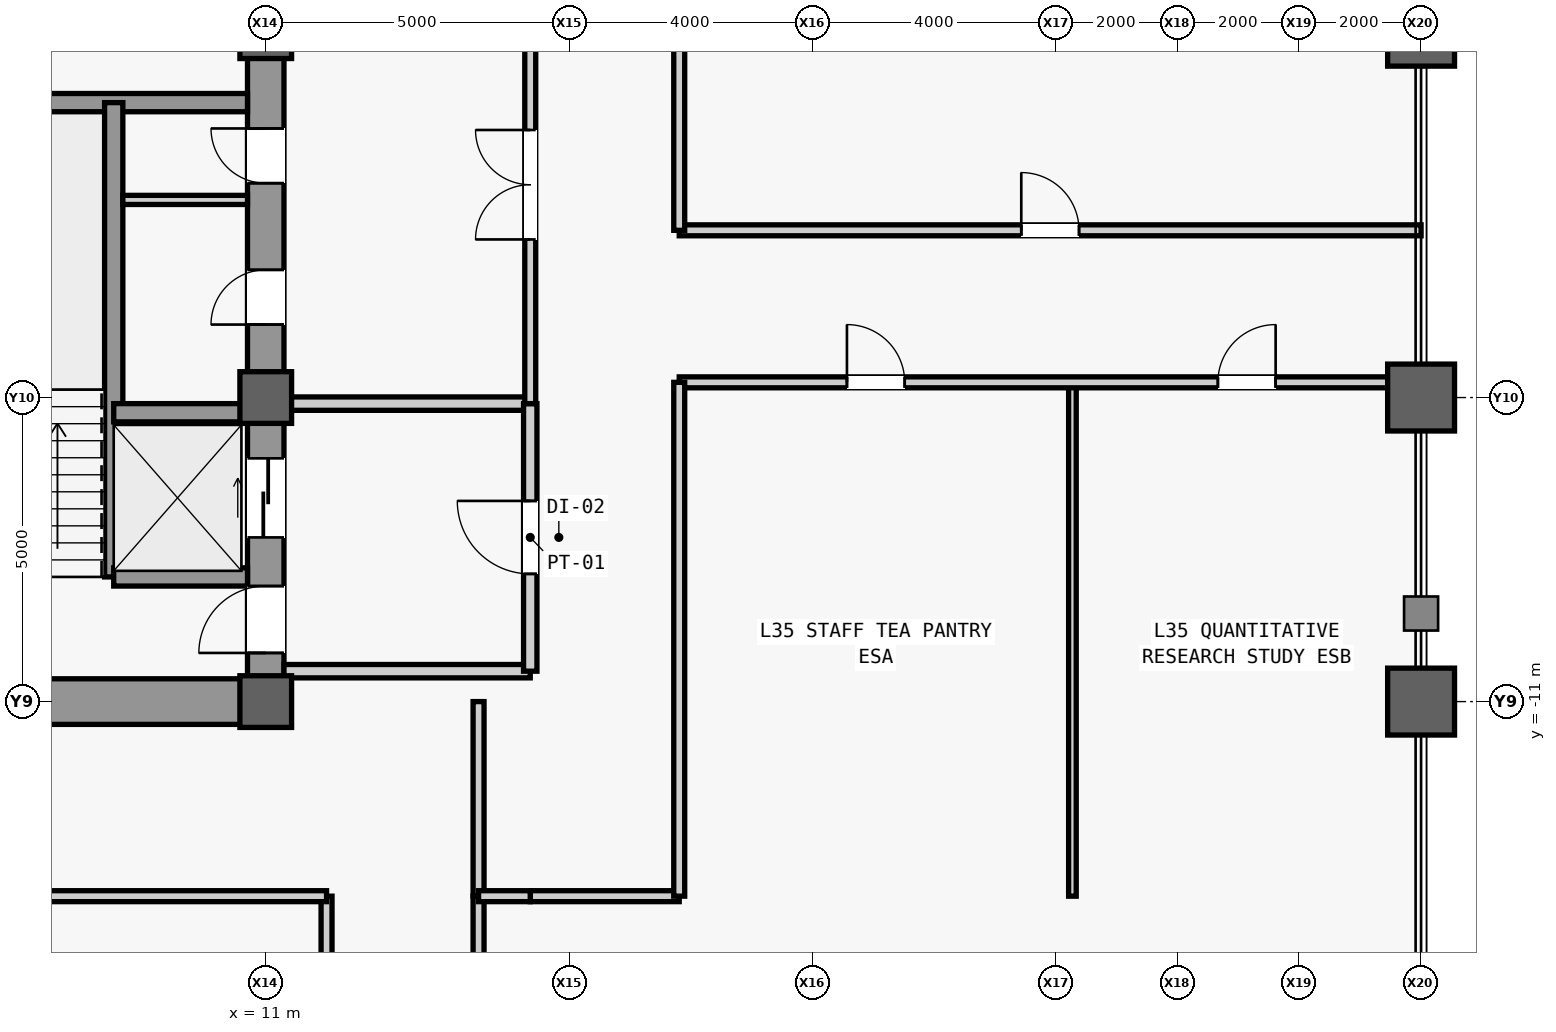
"""IFC4 building model, lengths in metres.
Left out: names, types, materials, properties, quantities, classifications, styles, units other than length and angle.
Written with IfcOpenShell. Run it as: python <this file> out.ifc"""

import sys

from ifc_helpers import new_model, si_unit, direction, frame, frame_2d, origin, origin_2d, place, context, subcontext, project, spatial, rectangle, hollow_rectangle, extrude, source, transform, mapped, element, fill, save


model = new_model("IFC4")
c1 = context("Model", 3, precision=1e-05, world=origin(), true_north=direction((0.0, 1.0)))
c2 = subcontext(c1, "Body", "Model", "MODEL_VIEW")
j1 = project(units=[si_unit("LENGTHUNIT", "METRE"), si_unit("PLANEANGLEUNIT", "RADIAN")], contexts=[c1])
p1 = place(None, origin())
s1 = spatial("IfcSite", under=j1, at=p1, CompositionType="ELEMENT")
p2 = place(p1, origin())
s2 = spatial("IfcBuilding", under=s1, at=p2, CompositionType="ELEMENT")
p3 = place(p2, frame((0.0, 0.0, 155.1)))
s3 = spatial("IfcBuildingStorey", under=s2, at=p3, CompositionType="ELEMENT", Elevation=155.1)
m1 = source(origin(), c2, "Body", "SweptSolid", [
    extrude(rectangle(XDim=22.0, YDim=0.6, at=frame_2d((11.0, 0.0))), origin(), (0.0, 0.0, 1.0), 3.78),
])
p4 = place(p3, frame((11.0, -11.0, 0.0), z_axis=(0.0, 0.0, 1.0), x_axis=(0.0, 1.0, 0.0)))
e1 = element("IfcWall", 1, at=p4, inside=s3, PredefinedType="SHEAR", context=c2, shape_type="MappedRepresentation", body=[
    mapped(m1, transform((0.0, 0.0, 0.0), scale=1.0)),
])
m2 = source(origin(), c2, "Body", "SweptSolid", [
    extrude(rectangle(XDim=1.1, YDim=2.2, at=frame_2d((0.55, 1.1))), frame((0.0, 0.31, 0.0), z_axis=(0.0, -1.0, 0.0), x_axis=(1.0, 0.0, 0.0)), (0.0, 0.0, 1.0), 0.62),
])
p5 = place(p4, frame((0.8, 0.0, 0.0)))
e2 = element("IfcOpeningElement", 2, at=p5, cuts=e1, PredefinedType="OPENING", context=c2, shape_type="MappedRepresentation", body=[
    mapped(m2, transform((0.0, 0.0, 0.0), scale=1.0)),
])
m3 = source(origin(), c2, "Body", "SweptSolid", [
    extrude(rectangle(XDim=0.9, YDim=2.15, at=frame_2d((0.45, 1.075))), frame((0.0, 0.31, 0.0), z_axis=(0.0, -1.0, 0.0), x_axis=(1.0, 0.0, 0.0)), (0.0, 0.0, 1.0), 0.62),
])
p6 = place(p4, frame((6.2, 0.0, 0.0)))
e3 = element("IfcOpeningElement", 3, at=p6, cuts=e1, PredefinedType="OPENING", context=c2, shape_type="MappedRepresentation", body=[
    mapped(m3, transform((0.0, 0.0, 0.0), scale=1.0)),
])
p7 = place(p4, frame((8.525, 0.0, 0.0)))
e4 = element("IfcOpeningElement", 4, at=p7, cuts=e1, PredefinedType="OPENING", context=c2, shape_type="MappedRepresentation", body=[
    mapped(m3, transform((0.0, 0.0, 0.0), scale=1.0)),
])
m4 = source(origin(), c2, "Body", "SweptSolid", [
    extrude(rectangle(XDim=1.3, YDim=2.3, at=frame_2d((0.65, 1.15))), frame((0.0, 0.31, 0.0), z_axis=(0.0, -1.0, 0.0), x_axis=(1.0, 0.0, 0.0)), (0.0, 0.0, 1.0), 0.62),
])
p8 = place(p4, frame((2.7, 0.0, 0.0)))
e5 = element("IfcOpeningElement", 5, at=p8, cuts=e1, PredefinedType="OPENING", context=c2, shape_type="MappedRepresentation", body=[
    mapped(m4, transform((0.0, 0.0, 0.0), scale=1.0)),
])
p9 = place(p4, frame((13.35, 0.0, 0.0)))
e6 = element("IfcOpeningElement", 6, at=p9, cuts=e1, PredefinedType="OPENING", context=c2, shape_type="MappedRepresentation", body=[
    mapped(m4, transform((0.0, 0.0, 0.0), scale=1.0)),
])
m5 = source(origin(), c2, "Body", "SweptSolid", [
    extrude(rectangle(XDim=5.85, YDim=0.75, at=frame_2d((2.925, 0.0))), origin(), (0.0, 0.0, 1.0), 3.78),
])
p10 = place(p3, frame((4.85, -11.0, 0.0), z_axis=(0.0, 0.0, 1.0), x_axis=(1.0, 0.0, 0.0)))
e7 = element("IfcWall", 7, at=p10, inside=s3, PredefinedType="SHEAR", context=c2, shape_type="MappedRepresentation", body=[
    mapped(m5, transform((0.0, 0.0, 0.0), scale=1.0)),
])
m6 = source(origin(), c2, "Body", "SweptSolid", [
    extrude(rectangle(XDim=5.6, YDim=0.3, at=frame_2d((2.8, 0.0))), origin(), (0.0, 0.0, 1.0), 3.78),
])
p11 = place(p3, frame((5.1, -1.15, 0.0), z_axis=(0.0, 0.0, 1.0), x_axis=(1.0, 0.0, 0.0)))
e8 = element("IfcWall", 8, at=p11, inside=s3, PredefinedType="SHEAR", context=c2, shape_type="MappedRepresentation", body=[
    mapped(m6, transform((0.0, 0.0, 0.0), scale=1.0)),
])
m7 = source(origin(), c2, "Body", "SweptSolid", [
    extrude(rectangle(XDim=0.85, YDim=0.85, at=origin_2d()), origin(), (0.0, 0.0, 1.0), 4.0),
])
for number, where, z_axis, x_axis in (
    (9, (11.0, -11.0, 0.0), (0.0, 0.0, 1.0), (1.0, 0.0, 0.0)),
    (10, (11.0, -6.0, 0.0), (0.0, 0.0, 1.0), (1.0, 0.0, 0.0)),
    (11, (11.0, 0.0, 0.0), (0.0, 0.0, 1.0), (1.0, 0.0, 0.0)),
):
    element("IfcColumn", number, at=place(p3, frame(where, z_axis=z_axis, x_axis=x_axis)), inside=s3, PredefinedType="COLUMN", context=c2, shape_type="MappedRepresentation", body=[
        mapped(m7, transform((0.0, 0.0, 0.0), scale=1.0)),
    ])
m8 = source(origin(), c2, "Body", "SweptSolid", [
    extrude(hollow_rectangle(XDim=1.1, YDim=1.1, WallThickness=0.06, at=origin_2d()), origin(), (0.0, 0.0, 1.0), 4.0),
])
for number, where, z_axis, x_axis in (
    (12, (30.0, -11.0, 0.0), (0.0, 0.0, 1.0), (1.0, 0.0, 0.0)),
    (13, (30.0, -6.0, 0.0), (0.0, 0.0, 1.0), (1.0, 0.0, 0.0)),
    (14, (30.0, 0.0, 0.0), (0.0, 0.0, 1.0), (1.0, 0.0, 0.0)),
):
    element("IfcColumn", number, at=place(p3, frame(where, z_axis=z_axis, x_axis=x_axis)), inside=s3, PredefinedType="COLUMN", context=c2, shape_type="MappedRepresentation", body=[
        mapped(m8, transform((0.0, 0.0, 0.0), scale=1.0)),
    ])
m9 = source(origin(), c2, "Body", "SweptSolid", [
    extrude(rectangle(XDim=7.8, YDim=0.3, at=frame_2d((3.9, 0.0))), origin(), (0.0, 0.0, 1.0), 3.78),
])
p12 = place(p3, frame((8.5, -8.95, 0.0), z_axis=(0.0, 0.0, 1.0), x_axis=(0.0, 1.0, 0.0)))
e15 = element("IfcWall", 15, at=p12, inside=s3, PredefinedType="SHEAR", context=c2, shape_type="MappedRepresentation", body=[
    mapped(m9, transform((0.0, 0.0, 0.0), scale=1.0)),
])
m10 = source(origin(), c2, "Body", "SweptSolid", [
    extrude(rectangle(XDim=2.2, YDim=0.3, at=frame_2d((1.1, 0.0))), origin(), (0.0, 0.0, 1.0), 3.78),
])
for number, where, z_axis, x_axis in (
    (16, (8.5, -8.95, 0.0), (0.0, 0.0, 1.0), (1.0, 0.0, 0.0)),
    (17, (8.5, -6.25, 0.0), (0.0, 0.0, 1.0), (1.0, 0.0, 0.0)),
):
    element("IfcWall", number, at=place(p3, frame(where, z_axis=z_axis, x_axis=x_axis)), inside=s3, PredefinedType="SHEAR", context=c2, shape_type="MappedRepresentation", body=[
        mapped(m10, transform((0.0, 0.0, 0.0), scale=1.0)),
    ])
m11 = source(origin(), c2, "Body", "SweptSolid", [
    extrude(rectangle(XDim=2.05, YDim=0.15, at=frame_2d((1.025, 0.0))), origin(), (0.0, 0.0, 1.0), 3.78),
])
p13 = place(p3, frame((8.65, -2.75, 0.0), z_axis=(0.0, 0.0, 1.0), x_axis=(1.0, 0.0, 0.0)))
e18 = element("IfcWall", 18, at=p13, inside=s3, PredefinedType="PARTITIONING", context=c2, shape_type="MappedRepresentation", body=[
    mapped(m11, transform((0.0, 0.0, 0.0), scale=1.0)),
])
m12 = source(origin(), c2, "Body", "SweptSolid", [
    extrude(rectangle(XDim=4.05, YDim=0.22, at=frame_2d((2.025, 0.0))), origin(), (0.0, 0.0, 1.0), 3.78),
])
p14 = place(p3, frame((11.3, -10.5, 0.0), z_axis=(0.0, 0.0, 1.0), x_axis=(1.0, 0.0, 0.0)))
e19 = element("IfcWall", 19, at=p14, inside=s3, PredefinedType="PARTITIONING", context=c2, shape_type="MappedRepresentation", body=[
    mapped(m12, transform((0.0, 0.0, 0.0), scale=1.0)),
])
m13 = source(origin(), c2, "Body", "SweptSolid", [
    extrude(rectangle(XDim=4.05, YDim=0.22, at=frame_2d((2.025, 0.0))), origin(), (0.0, 0.0, 1.0), 3.007),
])
p15 = place(p3, frame((11.3, -6.1, 0.0), z_axis=(0.0, 0.0, 1.0), x_axis=(1.0, 0.0, 0.0)))
e20 = element("IfcWall", 20, at=p15, inside=s3, PredefinedType="PARTITIONING", context=c2, shape_type="MappedRepresentation", body=[
    mapped(m13, transform((0.0, 0.0, 0.0), scale=1.0)),
])
m14 = source(origin(), c2, "Body", "SweptSolid", [
    extrude(rectangle(XDim=4.4, YDim=0.22, at=frame_2d((2.2, 0.0))), origin(), (0.0, 0.0, 1.0), 3.78),
])
p16 = place(p3, frame((15.35, -10.5, 0.0), z_axis=(0.0, 0.0, 1.0), x_axis=(0.0, 1.0, 0.0)))
e21 = element("IfcWall", 21, at=p16, inside=s3, PredefinedType="PARTITIONING", context=c2, shape_type="MappedRepresentation", body=[
    mapped(m14, transform((0.0, 0.0, 0.0), scale=1.0)),
])
m15 = source(origin(), c2, "Body", "SweptSolid", [
    extrude(rectangle(XDim=1.2, YDim=2.2, at=frame_2d((0.6, 1.1))), frame((0.0, 0.12, 0.0), z_axis=(0.0, -1.0, 0.0), x_axis=(1.0, 0.0, 0.0)), (0.0, 0.0, 1.0), 0.24),
])
p17 = place(p16, frame((1.6, 0.0, 0.0)))
e22 = element("IfcOpeningElement", 22, at=p17, cuts=e21, PredefinedType="OPENING", context=c2, shape_type="MappedRepresentation", body=[
    mapped(m15, transform((0.0, 0.0, 0.0), scale=1.0)),
])
m16 = source(origin(), c2, "Body", "SweptSolid", [
    extrude(rectangle(XDim=16.6, YDim=0.18, at=frame_2d((8.3, 0.0))), origin(), (0.0, 0.0, 1.0), 3.78),
])
p18 = place(p3, frame((15.35, -6.1, 0.0), z_axis=(0.0, 0.0, 1.0), x_axis=(0.0, 1.0, 0.0)))
e23 = element("IfcWall", 23, at=p18, inside=s3, PredefinedType="PARTITIONING", context=c2, shape_type="MappedRepresentation", body=[
    mapped(m16, transform((0.0, 0.0, 0.0), scale=1.0)),
])
m17 = source(origin(), c2, "Body", "SweptSolid", [
    extrude(rectangle(XDim=1.8, YDim=2.25, at=frame_2d((0.9, 1.125))), frame((0.0, 0.1, 0.0), z_axis=(0.0, -1.0, 0.0), x_axis=(1.0, 0.0, 0.0)), (0.0, 0.0, 1.0), 0.2),
])
p19 = place(p18, frame((2.7, 0.0, 0.0)))
e24 = element("IfcOpeningElement", 24, at=p19, cuts=e23, PredefinedType="OPENING", context=c2, shape_type="MappedRepresentation", body=[
    mapped(m17, transform((0.0, 0.0, 0.0), scale=1.0)),
])
p20 = place(p18, frame((13.0, 0.0, 0.0)))
e25 = element("IfcOpeningElement", 25, at=p20, cuts=e23, PredefinedType="OPENING", context=c2, shape_type="MappedRepresentation", body=[
    mapped(m17, transform((0.0, 0.0, 0.0), scale=1.0)),
])
m18 = source(origin(), c2, "Body", "SweptSolid", [
    extrude(rectangle(XDim=2.45, YDim=0.18, at=frame_2d((1.225, 0.0))), origin(), (0.0, 0.0, 1.0), 3.78),
])
p21 = place(p3, frame((15.35, -14.2, 0.0), z_axis=(0.0, 0.0, 1.0), x_axis=(1.0, 0.0, 0.0)))
e26 = element("IfcWall", 26, at=p21, inside=s3, PredefinedType="PARTITIONING", context=c2, shape_type="MappedRepresentation", body=[
    mapped(m18, transform((0.0, 0.0, 0.0), scale=1.0)),
])
m19 = source(origin(), c2, "Body", "SweptSolid", [
    extrude(rectangle(XDim=3.2, YDim=0.18, at=frame_2d((1.6, 0.0))), origin(), (0.0, 0.0, 1.0), 3.78),
])
p22 = place(p3, frame((14.5, -14.2, 0.0), z_axis=(0.0, 0.0, 1.0), x_axis=(0.0, 1.0, 0.0)))
e27 = element("IfcWall", 27, at=p22, inside=s3, PredefinedType="PARTITIONING", context=c2, shape_type="MappedRepresentation", body=[
    mapped(m19, transform((0.0, 0.0, 0.0), scale=1.0)),
])
m20 = source(origin(), c2, "Body", "SweptSolid", [
    extrude(rectangle(XDim=15.8, YDim=0.18, at=frame_2d((7.9, 0.0))), origin(), (0.0, 0.0, 1.0), 3.78),
])
p23 = place(p3, frame((12.0, -30.0, 0.0), z_axis=(0.0, 0.0, 1.0), x_axis=(0.0, 1.0, 0.0)))
e28 = element("IfcWall", 28, at=p23, inside=s3, PredefinedType="PARTITIONING", context=c2, shape_type="MappedRepresentation", body=[
    mapped(m20, transform((0.0, 0.0, 0.0), scale=1.0)),
])
m21 = source(origin(), c2, "Body", "SweptSolid", [
    extrude(rectangle(XDim=1.05, YDim=2.2, at=frame_2d((0.525, 1.1))), frame((0.0, 0.1, 0.0), z_axis=(0.0, -1.0, 0.0), x_axis=(1.0, 0.0, 0.0)), (0.0, 0.0, 1.0), 0.2),
])
p24 = place(p23, frame((3.425, 0.0, 0.0)))
e29 = element("IfcOpeningElement", 29, at=p24, cuts=e28, PredefinedType="OPENING", context=c2, shape_type="MappedRepresentation", body=[
    mapped(m21, transform((0.0, 0.0, 0.0), scale=1.0)),
])
m22 = source(origin(), c2, "Body", "SweptSolid", [
    extrude(rectangle(XDim=27.35, YDim=0.18, at=frame_2d((13.675, 0.0))), origin(), (0.0, 0.0, 1.0), 3.78),
])
p25 = place(p3, frame((-15.35, -14.2, 0.0), z_axis=(0.0, 0.0, 1.0), x_axis=(1.0, 0.0, 0.0)))
e30 = element("IfcWall", 30, at=p25, inside=s3, PredefinedType="PARTITIONING", context=c2, shape_type="MappedRepresentation", body=[
    mapped(m22, transform((0.0, 0.0, 0.0), scale=1.0)),
])
p26 = place(p3, frame((14.5, -30.0, 0.0), z_axis=(0.0, 0.0, 1.0), x_axis=(0.0, 1.0, 0.0)))
e31 = element("IfcWall", 31, at=p26, inside=s3, PredefinedType="PARTITIONING", context=c2, shape_type="MappedRepresentation", body=[
    mapped(m20, transform((0.0, 0.0, 0.0), scale=1.0)),
])
p27 = place(p26, frame((3.425, 0.0, 0.0)))
e32 = element("IfcOpeningElement", 32, at=p27, cuts=e31, PredefinedType="OPENING", context=c2, shape_type="MappedRepresentation", body=[
    mapped(m21, transform((0.0, 0.0, 0.0), scale=1.0)),
])
m23 = source(origin(), c2, "Body", "SweptSolid", [
    extrude(rectangle(XDim=0.85, YDim=0.18, at=frame_2d((0.425, 0.0))), origin(), (0.0, 0.0, 1.0), 3.78),
])
p28 = place(p3, frame((14.5, -14.2, 0.0), z_axis=(0.0, 0.0, 1.0), x_axis=(1.0, 0.0, 0.0)))
e33 = element("IfcWall", 33, at=p28, inside=s3, PredefinedType="PARTITIONING", context=c2, shape_type="MappedRepresentation", body=[
    mapped(m23, transform((0.0, 0.0, 0.0), scale=1.0)),
])
m24 = source(origin(), c2, "Body", "SweptSolid", [
    extrude(rectangle(XDim=8.45, YDim=0.125, at=frame_2d((4.225, 0.0))), origin(), (0.0, 0.0, 1.0), 3.78),
])
p29 = place(p3, frame((24.266, -14.2, 0.0), z_axis=(0.0, 0.0, 1.0), x_axis=(0.0, 1.0, 0.0)))
e34 = element("IfcWall", 34, at=p29, inside=s3, PredefinedType="PARTITIONING", context=c2, shape_type="MappedRepresentation", body=[
    mapped(m24, transform((0.0, 0.0, 0.0), scale=1.0)),
])
m25 = source(origin(), c2, "Body", "SweptSolid", [
    extrude(rectangle(XDim=12.2, YDim=0.18, at=frame_2d((6.1, 0.0))), origin(), (0.0, 0.0, 1.0), 3.007),
])
p30 = place(p3, frame((17.8, -5.75, 0.0), z_axis=(0.0, 0.0, 1.0), x_axis=(1.0, 0.0, 0.0)))
e35 = element("IfcWall", 35, at=p30, inside=s3, PredefinedType="PARTITIONING", context=c2, shape_type="MappedRepresentation", body=[
    mapped(m25, transform((0.0, 0.0, 0.0), scale=1.0)),
])
m26 = source(origin(), c2, "Body", "SweptSolid", [
    extrude(rectangle(XDim=0.95, YDim=2.15, at=frame_2d((0.475, 1.075))), frame((0.0, 0.1, 0.0), z_axis=(0.0, -1.0, 0.0), x_axis=(1.0, 0.0, 0.0)), (0.0, 0.0, 1.0), 0.2),
])
p31 = place(p30, frame((2.758, 0.0, 0.0)))
e36 = element("IfcOpeningElement", 36, at=p31, cuts=e35, PredefinedType="OPENING", context=c2, shape_type="MappedRepresentation", body=[
    mapped(m26, transform((0.0, 0.0, 0.0), scale=1.0)),
])
p32 = place(p30, frame((8.858, 0.0, 0.0)))
e37 = element("IfcOpeningElement", 37, at=p32, cuts=e35, PredefinedType="OPENING", context=c2, shape_type="MappedRepresentation", body=[
    mapped(m26, transform((0.0, 0.0, 0.0), scale=1.0)),
])
m27 = source(origin(), c2, "Body", "SweptSolid", [
    extrude(rectangle(XDim=8.45, YDim=0.18, at=frame_2d((4.225, 0.0))), origin(), (0.0, 0.0, 1.0), 3.78),
])
p33 = place(p3, frame((17.8, -14.2, 0.0), z_axis=(0.0, 0.0, 1.0), x_axis=(0.0, 1.0, 0.0)))
e38 = element("IfcWall", 38, at=p33, inside=s3, PredefinedType="PARTITIONING", context=c2, shape_type="MappedRepresentation", body=[
    mapped(m27, transform((0.0, 0.0, 0.0), scale=1.0)),
])
m28 = source(origin(), c2, "Body", "SweptSolid", [
    extrude(rectangle(XDim=12.2, YDim=0.18, at=frame_2d((6.1, 0.0))), origin(), (0.0, 0.0, 1.0), 3.78),
])
p34 = place(p3, frame((17.8, -3.25, 0.0), z_axis=(0.0, 0.0, 1.0), x_axis=(1.0, 0.0, 0.0)))
e39 = element("IfcWall", 39, at=p34, inside=s3, PredefinedType="PARTITIONING", context=c2, shape_type="MappedRepresentation", body=[
    mapped(m28, transform((0.0, 0.0, 0.0), scale=1.0)),
])
p35 = place(p34, frame((5.625, 0.0, 0.0)))
e40 = element("IfcOpeningElement", 40, at=p35, cuts=e39, PredefinedType="OPENING", context=c2, shape_type="MappedRepresentation", body=[
    mapped(m26, transform((0.0, 0.0, 0.0), scale=1.0)),
])
m29 = source(origin(), c2, "Body", "SweptSolid", [
    extrude(rectangle(XDim=16.75, YDim=0.18, at=frame_2d((8.375, 0.0))), origin(), (0.0, 0.0, 1.0), 3.78),
])
p36 = place(p3, frame((17.8, -3.25, 0.0), z_axis=(0.0, 0.0, 1.0), x_axis=(0.0, 1.0, 0.0)))
e41 = element("IfcWall", 41, at=p36, inside=s3, PredefinedType="PARTITIONING", context=c2, shape_type="MappedRepresentation", body=[
    mapped(m29, transform((0.0, 0.0, 0.0), scale=1.0)),
])
m30 = source(origin(), c2, "Body", "SweptSolid", [
    extrude(rectangle(XDim=1.1, YDim=2.2, at=frame_2d((0.55, 1.1))), frame((0.0, 0.025, 0.0), z_axis=(0.0, -1.0, 0.0), x_axis=(1.0, 0.0, 0.0)), (0.0, 0.0, 1.0), 0.05),
])
p37 = place(p5, origin())
e42 = element("IfcDoor", 42, at=p37, inside=s3, OperationType="SINGLE_SWING_LEFT", PredefinedType="DOOR", context=c2, shape_type="MappedRepresentation", body=[
    mapped(m30, transform((0.0, 0.0, 0.0), scale=1.0)),
])
fill(e2, e42)
m31 = source(origin(), c2, "Body", "SweptSolid", [
    extrude(rectangle(XDim=0.9, YDim=2.15, at=frame_2d((0.45, 1.075))), frame((0.0, 0.025, 0.0), z_axis=(0.0, -1.0, 0.0), x_axis=(1.0, 0.0, 0.0)), (0.0, 0.0, 1.0), 0.05),
])
p38 = place(p6, origin())
e43 = element("IfcDoor", 43, at=p38, inside=s3, OperationType="SINGLE_SWING_LEFT", PredefinedType="DOOR", context=c2, shape_type="MappedRepresentation", body=[
    mapped(m31, transform((0.0, 0.0, 0.0), scale=1.0)),
])
fill(e3, e43)
p39 = place(p7, origin())
e44 = element("IfcDoor", 44, at=p39, inside=s3, OperationType="SINGLE_SWING_RIGHT", PredefinedType="DOOR", context=c2, shape_type="MappedRepresentation", body=[
    mapped(m31, transform((0.0, 0.0, 0.0), scale=1.0)),
])
fill(e4, e44)
m32 = source(origin(), c2, "Body", "SweptSolid", [
    extrude(rectangle(XDim=1.2, YDim=2.2, at=frame_2d((0.6, 1.1))), frame((0.0, 0.025, 0.0), z_axis=(0.0, -1.0, 0.0), x_axis=(1.0, 0.0, 0.0)), (0.0, 0.0, 1.0), 0.05),
])
p40 = place(p17, origin())
e45 = element("IfcDoor", 45, at=p40, inside=s3, OperationType="SINGLE_SWING_RIGHT", PredefinedType="DOOR", context=c2, shape_type="MappedRepresentation", body=[
    mapped(m32, transform((0.0, 0.0, 0.0), scale=1.0)),
])
fill(e22, e45)
m33 = source(origin(), c2, "Body", "SweptSolid", [
    extrude(rectangle(XDim=1.8, YDim=2.25, at=frame_2d((0.9, 1.125))), frame((0.0, 0.025, 0.0), z_axis=(0.0, -1.0, 0.0), x_axis=(1.0, 0.0, 0.0)), (0.0, 0.0, 1.0), 0.05),
])
p41 = place(p19, origin())
e46 = element("IfcDoor", 46, at=p41, inside=s3, OperationType="SINGLE_SWING_RIGHT", PredefinedType="DOOR", context=c2, shape_type="MappedRepresentation", body=[
    mapped(m33, transform((0.0, 0.0, 0.0), scale=1.0)),
])
fill(e24, e46)
m34 = source(origin(), c2, "Body", "SweptSolid", [
    extrude(rectangle(XDim=0.95, YDim=2.15, at=frame_2d((0.475, 1.075))), frame((0.0, 0.025, 0.0), z_axis=(0.0, -1.0, 0.0), x_axis=(1.0, 0.0, 0.0)), (0.0, 0.0, 1.0), 0.05),
])
p42 = place(p31, origin())
e47 = element("IfcDoor", 47, at=p42, inside=s3, OperationType="SINGLE_SWING_LEFT", PredefinedType="DOOR", context=c2, shape_type="MappedRepresentation", body=[
    mapped(m34, transform((0.0, 0.0, 0.0), scale=1.0)),
])
fill(e36, e47)
p43 = place(p32, origin())
e48 = element("IfcDoor", 48, at=p43, inside=s3, OperationType="SINGLE_SWING_RIGHT", PredefinedType="DOOR", context=c2, shape_type="MappedRepresentation", body=[
    mapped(m34, transform((0.0, 0.0, 0.0), scale=1.0)),
])
fill(e37, e48)
p44 = place(p35, origin())
e49 = element("IfcDoor", 49, at=p44, inside=s3, OperationType="SINGLE_SWING_LEFT", PredefinedType="DOOR", context=c2, shape_type="MappedRepresentation", body=[
    mapped(m34, transform((0.0, 0.0, 0.0), scale=1.0)),
])
fill(e40, e49)
m35 = source(origin(), c2, "Body", "SweptSolid", [
    extrude(rectangle(XDim=1.3, YDim=2.3, at=frame_2d((0.65, 1.15))), frame((0.0, 0.025, 0.0), z_axis=(0.0, -1.0, 0.0), x_axis=(1.0, 0.0, 0.0)), (0.0, 0.0, 1.0), 0.05),
])
p45 = place(p8, origin())
e50 = element("IfcDoor", 50, at=p45, inside=s3, OperationType="SLIDING_TO_LEFT", PredefinedType="DOOR", context=c2, shape_type="MappedRepresentation", body=[
    mapped(m35, transform((0.0, 0.0, 0.0), scale=1.0)),
])
fill(e5, e50)
save(model, sys.argv[1])
